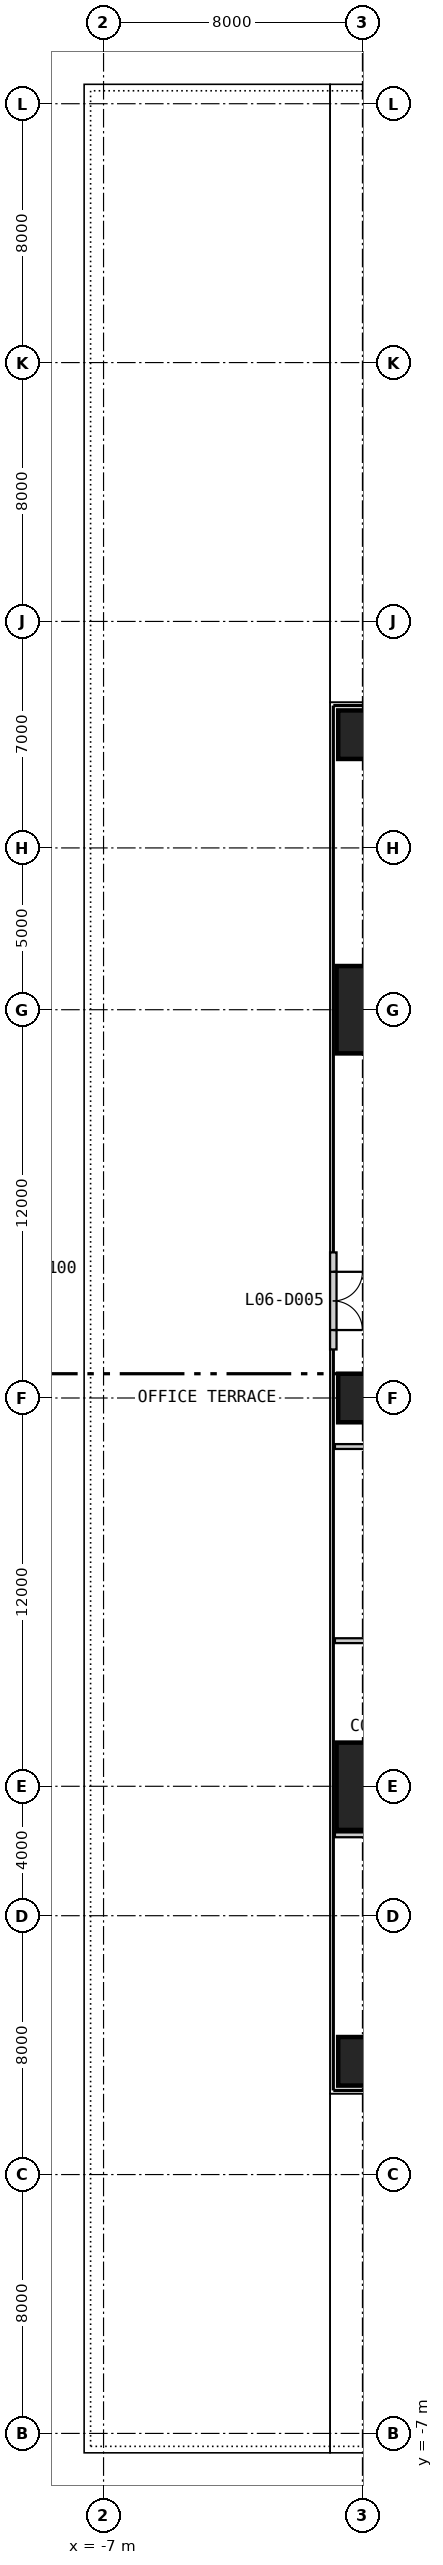
"""IFC4 building model, lengths in metres.
Left out: names, types, materials, properties, quantities, classifications, styles, units other than length and angle.
Written with IfcOpenShell. Run it as: python <this file> out.ifc"""

import sys

from ifc_helpers import new_model, si_unit, direction, frame, frame_2d, origin, origin_2d, place, context, subcontext, project, spatial, rectangle, extrude, element, fill, save


model = new_model("IFC4")
c1 = context("Model", 3, precision=1e-05, world=origin(), true_north=direction((0.0, 1.0)))
c2 = subcontext(c1, "Body", "Model", "MODEL_VIEW")
j1 = project(units=[si_unit("LENGTHUNIT", "METRE"), si_unit("PLANEANGLEUNIT", "RADIAN")], contexts=[c1])
p1 = place(None, origin())
s1 = spatial("IfcSite", under=j1, at=p1, CompositionType="ELEMENT")
p2 = place(p1, origin())
s2 = spatial("IfcBuilding", under=s1, at=p2, CompositionType="ELEMENT")
p3 = place(p2, frame((0.0, 0.0, 31.0)))
s3 = spatial("IfcBuildingStorey", under=s2, at=p3, CompositionType="ELEMENT", Elevation=31.0)
p4 = place(p3, frame((1.0, 45.5, 0.0), z_axis=(0.0, 0.0, 1.0), x_axis=(1.0, 0.0, 0.0)))
e1 = element("IfcColumn", 1, at=p4, inside=s3, PredefinedType="COLUMN", context=c2, shape_type="SweptSolid", body=[
    extrude(rectangle(XDim=1.5, YDim=1.5, at=origin_2d()), origin(), (0.0, 0.0, 1.0), 4.0),
])
p5 = place(p3, frame((1.0, 37.0, 0.0), z_axis=(0.0, 0.0, 1.0), x_axis=(1.0, 0.0, 0.0)))
e2 = element("IfcColumn", 2, at=p5, inside=s3, PredefinedType="COLUMN", context=c2, shape_type="SweptSolid", body=[
    extrude(rectangle(XDim=1.6, YDim=2.7, at=origin_2d()), origin(), (0.0, 0.0, 1.0), 4.0),
])
p6 = place(p3, frame((1.0, 25.0, 0.0), z_axis=(0.0, 0.0, 1.0), x_axis=(1.0, 0.0, 0.0)))
e3 = element("IfcColumn", 3, at=p6, inside=s3, PredefinedType="COLUMN", context=c2, shape_type="SweptSolid", body=[
    extrude(rectangle(XDim=1.5, YDim=1.5, at=origin_2d()), origin(), (0.0, 0.0, 1.0), 4.0),
])
p7 = place(p3, frame((1.0, 13.0, 0.0), z_axis=(0.0, 0.0, 1.0), x_axis=(1.0, 0.0, 0.0)))
e4 = element("IfcColumn", 4, at=p7, inside=s3, PredefinedType="COLUMN", context=c2, shape_type="SweptSolid", body=[
    extrude(rectangle(XDim=1.6, YDim=2.7, at=origin_2d()), origin(), (0.0, 0.0, 1.0), 4.0),
])
p8 = place(p3, frame((1.0, 4.5, 0.0), z_axis=(0.0, 0.0, 1.0), x_axis=(1.0, 0.0, 0.0)))
e5 = element("IfcColumn", 5, at=p8, inside=s3, PredefinedType="COLUMN", context=c2, shape_type="SweptSolid", body=[
    extrude(rectangle(XDim=1.5, YDim=1.5, at=origin_2d()), origin(), (0.0, 0.0, 1.0), 4.0),
])
p9 = place(p3, frame((0.1, 29.5, 0.0), z_axis=(0.0, 0.0, 1.0), x_axis=(0.0, -1.0, 0.0)))
e6 = element("IfcWall", 6, at=p9, inside=s3, PredefinedType="SOLIDWALL", context=c2, shape_type="SweptSolid", body=[
    extrude(rectangle(XDim=3.0, YDim=0.2, at=frame_2d((1.5, 0.0))), origin(), (0.0, 0.0, 1.0), 3.85),
])
p10 = place(p9, frame((0.6, 0.0, 0.0)))
e7 = element("IfcOpeningElement", 7, at=p10, cuts=e6, PredefinedType="OPENING", context=c2, shape_type="SweptSolid", body=[
    extrude(rectangle(XDim=1.8, YDim=2.4, at=frame_2d((0.9, 1.2))), frame((0.0, 0.11, 0.0), z_axis=(0.0, -1.0, 0.0), x_axis=(1.0, 0.0, 0.0)), (0.0, 0.0, 1.0), 0.22),
])
for number, where, z_axis, x_axis in (
    (8, (0.15, 11.5, 0.0), (0.0, 0.0, 1.0), (1.0, 0.0, 0.0)),
    (9, (0.15, 23.5, 0.0), (0.0, 0.0, 1.0), (1.0, 0.0, 0.0)),
    (10, (0.15, 17.5, 0.0), (0.0, 0.0, 1.0), (1.0, 0.0, 0.0)),
):
    element("IfcWall", number, at=place(p3, frame(where, z_axis=z_axis, x_axis=x_axis)), inside=s3, PredefinedType="PARTITIONING", context=c2, shape_type="SweptSolid", body=[
        extrude(rectangle(XDim=11.35, YDim=0.15, at=frame_2d((5.675, 0.0))), origin(), (0.0, 0.0, 1.0), 3.85),
    ])
p11 = place(p10, origin())
e11 = element("IfcDoor", 11, at=p11, inside=s3, OperationType="DOUBLE_DOOR_SINGLE_SWING", PredefinedType="DOOR", context=c2, shape_type="SweptSolid", body=[
    extrude(rectangle(XDim=1.8, YDim=2.4, at=frame_2d((0.9, 1.2))), frame((0.0, 0.025, 0.0), z_axis=(0.0, -1.0, 0.0), x_axis=(1.0, 0.0, 0.0)), (0.0, 0.0, 1.0), 0.05),
])
fill(e7, e11)
save(model, sys.argv[1])
